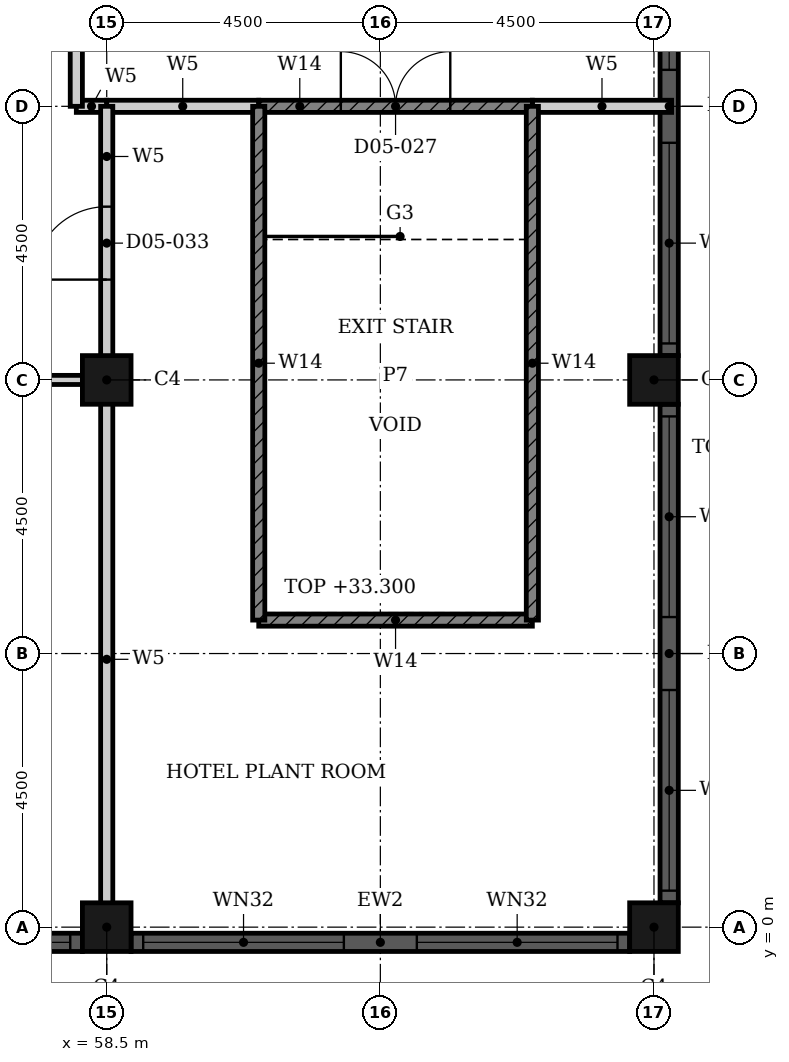
"""IFC4 building model, lengths in metres.
Left out: names, types, materials, properties, quantities, classifications, styles, units other than length and angle.
Written with IfcOpenShell. Run it as: python <this file> out.ifc"""

import sys

from ifc_helpers import new_model, si_unit, direction, frame, frame_2d, origin, origin_2d, place, context, subcontext, project, spatial, rectangle, hollow_rectangle, extrude, element, fill, save


model = new_model("IFC4")
c1 = context("Model", 3, precision=1e-05, world=origin(), true_north=direction((0.0, 1.0)))
c2 = subcontext(c1, "Body", "Model", "MODEL_VIEW")
j1 = project(units=[si_unit("LENGTHUNIT", "METRE"), si_unit("PLANEANGLEUNIT", "RADIAN")], contexts=[c1])
p1 = place(None, origin())
s1 = spatial("IfcSite", under=j1, at=p1, CompositionType="ELEMENT")
p2 = place(p1, origin())
s2 = spatial("IfcBuilding", under=s1, at=p2, CompositionType="ELEMENT")
p3 = place(p2, frame((0.0, 0.0, 28.8)))
s3 = spatial("IfcBuildingStorey", under=s2, at=p3, CompositionType="ELEMENT", Elevation=28.8)
for number, where, z_axis, x_axis in (
    (1, (58.5, 0.0, 0.0), (0.0, 0.0, 1.0), (1.0, 0.0, 0.0)),
    (2, (67.5, 0.0, 0.0), (0.0, 0.0, 1.0), (1.0, 0.0, 0.0)),
    (3, (67.5, 9.0, 0.0), (0.0, 0.0, 1.0), (1.0, 0.0, 0.0)),
    (4, (58.5, 9.0, 0.0), (0.0, 0.0, 1.0), (1.0, 0.0, 0.0)),
):
    element("IfcColumn", number, at=place(p3, frame(where, z_axis=z_axis, x_axis=x_axis)), inside=s3, PredefinedType="COLUMN", context=c2, shape_type="SweptSolid", body=[
        extrude(hollow_rectangle(XDim=0.8, YDim=0.8, WallThickness=0.025, at=origin_2d()), origin(), (0.0, 0.0, 1.0), 4.5),
    ])
p4 = place(p3, frame((67.75, 0.4, 0.0), z_axis=(0.0, 0.0, 1.0), x_axis=(0.0, 1.0, 0.0)))
e5 = element("IfcWall", 5, at=p4, inside=s3, PredefinedType="SOLIDWALL", context=c2, shape_type="SweptSolid", body=[
    extrude(rectangle(XDim=8.2, YDim=0.3, at=frame_2d((4.1, 0.0))), origin(), (0.0, 0.0, 1.0), 4.8),
])
p5 = place(p4, frame((0.2, 0.0, 0.9)))
e6 = element("IfcOpeningElement", 6, at=p5, cuts=e5, PredefinedType="OPENING", context=c2, shape_type="SweptSolid", body=[
    extrude(rectangle(XDim=3.3, YDim=2.9, at=frame_2d((1.65, 1.45))), frame((0.0, 0.16, 0.0), z_axis=(0.0, -1.0, 0.0), x_axis=(1.0, 0.0, 0.0)), (0.0, 0.0, 1.0), 0.32),
])
p6 = place(p4, frame((4.7, 0.0, 0.9)))
e7 = element("IfcOpeningElement", 7, at=p6, cuts=e5, PredefinedType="OPENING", context=c2, shape_type="SweptSolid", body=[
    extrude(rectangle(XDim=3.3, YDim=2.9, at=frame_2d((1.65, 1.45))), frame((0.0, 0.16, 0.0), z_axis=(0.0, -1.0, 0.0), x_axis=(1.0, 0.0, 0.0)), (0.0, 0.0, 1.0), 0.32),
])
p7 = place(p3, frame((67.75, 9.4, 0.0), z_axis=(0.0, 0.0, 1.0), x_axis=(0.0, 1.0, 0.0)))
e8 = element("IfcWall", 8, at=p7, inside=s3, PredefinedType="SOLIDWALL", context=c2, shape_type="SweptSolid", body=[
    extrude(rectangle(XDim=8.2, YDim=0.3, at=frame_2d((4.1, 0.0))), origin(), (0.0, 0.0, 1.0), 4.8),
])
p8 = place(p7, frame((0.2, 0.0, 0.9)))
e9 = element("IfcOpeningElement", 9, at=p8, cuts=e8, PredefinedType="OPENING", context=c2, shape_type="SweptSolid", body=[
    extrude(rectangle(XDim=3.3, YDim=2.9, at=frame_2d((1.65, 1.45))), frame((0.0, 0.16, 0.0), z_axis=(0.0, -1.0, 0.0), x_axis=(1.0, 0.0, 0.0)), (0.0, 0.0, 1.0), 0.32),
])
p9 = place(p7, frame((4.7, 0.0, 0.9)))
e10 = element("IfcOpeningElement", 10, at=p9, cuts=e8, PredefinedType="OPENING", context=c2, shape_type="SweptSolid", body=[
    extrude(rectangle(XDim=3.3, YDim=2.9, at=frame_2d((1.65, 1.45))), frame((0.0, 0.16, 0.0), z_axis=(0.0, -1.0, 0.0), x_axis=(1.0, 0.0, 0.0)), (0.0, 0.0, 1.0), 0.32),
])
p10 = place(p3, frame((49.9, -0.25, 0.0), z_axis=(0.0, 0.0, 1.0), x_axis=(1.0, 0.0, 0.0)))
e11 = element("IfcWall", 11, at=p10, inside=s3, PredefinedType="SOLIDWALL", context=c2, shape_type="SweptSolid", body=[
    extrude(rectangle(XDim=8.2, YDim=0.3, at=frame_2d((4.1, 0.0))), origin(), (0.0, 0.0, 1.0), 4.8),
])
p11 = place(p10, frame((0.2, 0.0, 0.9)))
e12 = element("IfcOpeningElement", 12, at=p11, cuts=e11, PredefinedType="OPENING", context=c2, shape_type="SweptSolid", body=[
    extrude(rectangle(XDim=3.3, YDim=2.9, at=frame_2d((1.65, 1.45))), frame((0.0, 0.16, 0.0), z_axis=(0.0, -1.0, 0.0), x_axis=(1.0, 0.0, 0.0)), (0.0, 0.0, 1.0), 0.32),
])
p12 = place(p10, frame((4.7, 0.0, 0.9)))
e13 = element("IfcOpeningElement", 13, at=p12, cuts=e11, PredefinedType="OPENING", context=c2, shape_type="SweptSolid", body=[
    extrude(rectangle(XDim=3.3, YDim=2.9, at=frame_2d((1.65, 1.45))), frame((0.0, 0.16, 0.0), z_axis=(0.0, -1.0, 0.0), x_axis=(1.0, 0.0, 0.0)), (0.0, 0.0, 1.0), 0.32),
])
p13 = place(p3, frame((58.9, -0.25, 0.0), z_axis=(0.0, 0.0, 1.0), x_axis=(1.0, 0.0, 0.0)))
e14 = element("IfcWall", 14, at=p13, inside=s3, PredefinedType="SOLIDWALL", context=c2, shape_type="SweptSolid", body=[
    extrude(rectangle(XDim=8.2, YDim=0.3, at=frame_2d((4.1, 0.0))), origin(), (0.0, 0.0, 1.0), 4.8),
])
p14 = place(p13, frame((0.2, 0.0, 0.9)))
e15 = element("IfcOpeningElement", 15, at=p14, cuts=e14, PredefinedType="OPENING", context=c2, shape_type="SweptSolid", body=[
    extrude(rectangle(XDim=3.3, YDim=2.9, at=frame_2d((1.65, 1.45))), frame((0.0, 0.16, 0.0), z_axis=(0.0, -1.0, 0.0), x_axis=(1.0, 0.0, 0.0)), (0.0, 0.0, 1.0), 0.32),
])
p15 = place(p13, frame((4.7, 0.0, 0.9)))
e16 = element("IfcOpeningElement", 16, at=p15, cuts=e14, PredefinedType="OPENING", context=c2, shape_type="SweptSolid", body=[
    extrude(rectangle(XDim=3.3, YDim=2.9, at=frame_2d((1.65, 1.45))), frame((0.0, 0.16, 0.0), z_axis=(0.0, -1.0, 0.0), x_axis=(1.0, 0.0, 0.0)), (0.0, 0.0, 1.0), 0.32),
])
p16 = place(p3, frame((55.4, 9.0, 0.0), z_axis=(0.0, 0.0, 1.0), x_axis=(1.0, 0.0, 0.0)))
e17 = element("IfcWall", 17, at=p16, inside=s3, PredefinedType="PARTITIONING", context=c2, shape_type="SweptSolid", body=[
    extrude(rectangle(XDim=3.1, YDim=0.15, at=frame_2d((1.55, 0.0))), origin(), (0.0, 0.0, 1.0), 4.5),
])
p17 = place(p3, frame((58.0, 13.5, 0.0), z_axis=(0.0, 0.0, 1.0), x_axis=(1.0, 0.0, 0.0)))
e18 = element("IfcWall", 18, at=p17, inside=s3, PredefinedType="PARTITIONING", context=c2, shape_type="SweptSolid", body=[
    extrude(rectangle(XDim=0.5, YDim=0.2, at=frame_2d((0.25, 0.0))), origin(), (0.0, 0.0, 1.0), 4.5),
])
p18 = place(p3, frame((58.5, 13.5, 0.0), z_axis=(0.0, 0.0, 1.0), x_axis=(1.0, 0.0, 0.0)))
e19 = element("IfcWall", 19, at=p18, inside=s3, PredefinedType="PARTITIONING", context=c2, shape_type="SweptSolid", body=[
    extrude(rectangle(XDim=2.5, YDim=0.2, at=frame_2d((1.25, 0.0))), origin(), (0.0, 0.0, 1.0), 4.5),
])
p19 = place(p3, frame((65.5, 13.5, 0.0), z_axis=(0.0, 0.0, 1.0), x_axis=(1.0, 0.0, 0.0)))
e20 = element("IfcWall", 20, at=p19, inside=s3, PredefinedType="PARTITIONING", context=c2, shape_type="SweptSolid", body=[
    extrude(rectangle(XDim=2.29, YDim=0.2, at=frame_2d((1.145, 0.0))), origin(), (0.0, 0.0, 1.0), 4.5),
])
p20 = place(p3, frame((58.0, 13.5, 0.0), z_axis=(0.0, 0.0, 1.0), x_axis=(0.0, 1.0, 0.0)))
e21 = element("IfcWall", 21, at=p20, inside=s3, PredefinedType="PARTITIONING", context=c2, shape_type="SweptSolid", body=[
    extrude(rectangle(XDim=3.0, YDim=0.2, at=frame_2d((1.5, 0.0))), origin(), (0.0, 0.0, 1.0), 4.5),
])
p21 = place(p3, frame((58.5, 9.0, 0.0), z_axis=(0.0, 0.0, 1.0), x_axis=(0.0, 1.0, 0.0)))
e22 = element("IfcWall", 22, at=p21, inside=s3, PredefinedType="PARTITIONING", context=c2, shape_type="SweptSolid", body=[
    extrude(rectangle(XDim=4.5, YDim=0.2, at=frame_2d((2.25, 0.0))), origin(), (0.0, 0.0, 1.0), 4.5),
])
p22 = place(p21, frame((1.65, 0.0, 0.0)))
e23 = element("IfcOpeningElement", 23, at=p22, cuts=e22, PredefinedType="OPENING", context=c2, shape_type="SweptSolid", body=[
    extrude(rectangle(XDim=1.2, YDim=2.1, at=frame_2d((0.6, 1.05))), frame((0.0, 0.11, 0.0), z_axis=(0.0, -1.0, 0.0), x_axis=(1.0, 0.0, 0.0)), (0.0, 0.0, 1.0), 0.22),
])
p23 = place(p3, frame((58.5, -0.19, 0.0), z_axis=(0.0, 0.0, 1.0), x_axis=(0.0, 1.0, 0.0)))
e24 = element("IfcWall", 24, at=p23, inside=s3, PredefinedType="PARTITIONING", context=c2, shape_type="SweptSolid", body=[
    extrude(rectangle(XDim=9.19, YDim=0.2, at=frame_2d((4.595, 0.0))), origin(), (0.0, 0.0, 1.0), 4.5),
])
p24 = place(p3, frame((61.0, 13.5, 0.0), z_axis=(0.0, 0.0, 1.0), x_axis=(1.0, 0.0, 0.0)))
e25 = element("IfcWall", 25, at=p24, inside=s3, PredefinedType="SHEAR", context=c2, shape_type="SweptSolid", body=[
    extrude(rectangle(XDim=4.5, YDim=0.2, at=frame_2d((2.25, 0.0))), origin(), (0.0, 0.0, 1.0), 4.5),
])
p25 = place(p24, frame((1.35, 0.0, 0.0)))
e26 = element("IfcOpeningElement", 26, at=p25, cuts=e25, PredefinedType="OPENING", context=c2, shape_type="SweptSolid", body=[
    extrude(rectangle(XDim=1.8, YDim=2.1, at=frame_2d((0.9, 1.05))), frame((0.0, 0.11, 0.0), z_axis=(0.0, -1.0, 0.0), x_axis=(1.0, 0.0, 0.0)), (0.0, 0.0, 1.0), 0.22),
])
p26 = place(p3, frame((61.0, 5.05, 0.0), z_axis=(0.0, 0.0, 1.0), x_axis=(1.0, 0.0, 0.0)))
e27 = element("IfcWall", 27, at=p26, inside=s3, PredefinedType="SHEAR", context=c2, shape_type="SweptSolid", body=[
    extrude(rectangle(XDim=4.5, YDim=0.2, at=frame_2d((2.25, 0.0))), origin(), (0.0, 0.0, 1.0), 4.5),
])
for number, where, z_axis, x_axis in (
    (28, (61.0, 5.05, 0.0), (0.0, 0.0, 1.0), (0.0, 1.0, 0.0)),
    (29, (65.5, 5.05, 0.0), (0.0, 0.0, 1.0), (0.0, 1.0, 0.0)),
):
    element("IfcWall", number, at=place(p3, frame(where, z_axis=z_axis, x_axis=x_axis)), inside=s3, PredefinedType="SHEAR", context=c2, shape_type="SweptSolid", body=[
        extrude(rectangle(XDim=8.45, YDim=0.2, at=frame_2d((4.225, 0.0))), origin(), (0.0, 0.0, 1.0), 4.5),
    ])
p27 = place(p5, origin())
e30 = element("IfcWindow", 30, at=p27, inside=s3, PartitioningType="SINGLE_PANEL", PredefinedType="WINDOW", context=c2, shape_type="SweptSolid", body=[
    extrude(rectangle(XDim=3.3, YDim=2.9, at=frame_2d((1.65, 1.45))), frame((0.0, 0.03, 0.0), z_axis=(0.0, -1.0, 0.0), x_axis=(1.0, 0.0, 0.0)), (0.0, 0.0, 1.0), 0.06),
])
fill(e6, e30)
p28 = place(p6, origin())
e31 = element("IfcWindow", 31, at=p28, inside=s3, PartitioningType="SINGLE_PANEL", PredefinedType="WINDOW", context=c2, shape_type="SweptSolid", body=[
    extrude(rectangle(XDim=3.3, YDim=2.9, at=frame_2d((1.65, 1.45))), frame((0.0, 0.03, 0.0), z_axis=(0.0, -1.0, 0.0), x_axis=(1.0, 0.0, 0.0)), (0.0, 0.0, 1.0), 0.06),
])
fill(e7, e31)
p29 = place(p8, origin())
e32 = element("IfcWindow", 32, at=p29, inside=s3, PartitioningType="SINGLE_PANEL", PredefinedType="WINDOW", context=c2, shape_type="SweptSolid", body=[
    extrude(rectangle(XDim=3.3, YDim=2.9, at=frame_2d((1.65, 1.45))), frame((0.0, 0.03, 0.0), z_axis=(0.0, -1.0, 0.0), x_axis=(1.0, 0.0, 0.0)), (0.0, 0.0, 1.0), 0.06),
])
fill(e9, e32)
p30 = place(p9, origin())
e33 = element("IfcWindow", 33, at=p30, inside=s3, PartitioningType="SINGLE_PANEL", PredefinedType="WINDOW", context=c2, shape_type="SweptSolid", body=[
    extrude(rectangle(XDim=3.3, YDim=2.9, at=frame_2d((1.65, 1.45))), frame((0.0, 0.03, 0.0), z_axis=(0.0, -1.0, 0.0), x_axis=(1.0, 0.0, 0.0)), (0.0, 0.0, 1.0), 0.06),
])
fill(e10, e33)
p31 = place(p12, origin())
e34 = element("IfcWindow", 34, at=p31, inside=s3, PartitioningType="SINGLE_PANEL", PredefinedType="WINDOW", context=c2, shape_type="SweptSolid", body=[
    extrude(rectangle(XDim=3.3, YDim=2.9, at=frame_2d((1.65, 1.45))), frame((0.0, 0.03, 0.0), z_axis=(0.0, -1.0, 0.0), x_axis=(1.0, 0.0, 0.0)), (0.0, 0.0, 1.0), 0.06),
])
fill(e13, e34)
p32 = place(p14, origin())
e35 = element("IfcWindow", 35, at=p32, inside=s3, PartitioningType="SINGLE_PANEL", PredefinedType="WINDOW", context=c2, shape_type="SweptSolid", body=[
    extrude(rectangle(XDim=3.3, YDim=2.9, at=frame_2d((1.65, 1.45))), frame((0.0, 0.03, 0.0), z_axis=(0.0, -1.0, 0.0), x_axis=(1.0, 0.0, 0.0)), (0.0, 0.0, 1.0), 0.06),
])
fill(e15, e35)
p33 = place(p15, origin())
e36 = element("IfcWindow", 36, at=p33, inside=s3, PartitioningType="SINGLE_PANEL", PredefinedType="WINDOW", context=c2, shape_type="SweptSolid", body=[
    extrude(rectangle(XDim=3.3, YDim=2.9, at=frame_2d((1.65, 1.45))), frame((0.0, 0.03, 0.0), z_axis=(0.0, -1.0, 0.0), x_axis=(1.0, 0.0, 0.0)), (0.0, 0.0, 1.0), 0.06),
])
fill(e16, e36)
p34 = place(p25, origin())
e37 = element("IfcDoor", 37, at=p34, inside=s3, OperationType="DOUBLE_DOOR_SINGLE_SWING", PredefinedType="DOOR", context=c2, shape_type="SweptSolid", body=[
    extrude(rectangle(XDim=1.8, YDim=2.1, at=frame_2d((0.9, 1.05))), frame((0.0, 0.025, 0.0), z_axis=(0.0, -1.0, 0.0), x_axis=(1.0, 0.0, 0.0)), (0.0, 0.0, 1.0), 0.05),
])
fill(e26, e37)
p35 = place(p22, origin())
e38 = element("IfcDoor", 38, at=p35, inside=s3, OperationType="SINGLE_SWING_LEFT", PredefinedType="DOOR", context=c2, shape_type="SweptSolid", body=[
    extrude(rectangle(XDim=1.2, YDim=2.1, at=frame_2d((0.6, 1.05))), frame((0.0, 0.025, 0.0), z_axis=(0.0, -1.0, 0.0), x_axis=(1.0, 0.0, 0.0)), (0.0, 0.0, 1.0), 0.05),
])
fill(e23, e38)
save(model, sys.argv[1])
